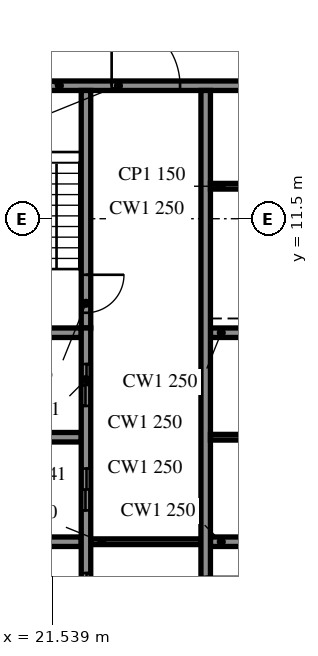
"""IFC4 building model, lengths in metres.
Left out: names, types, materials, properties, quantities, classifications, styles, units other than length and angle.
Written with IfcOpenShell. Run it as: python <this file> out.ifc"""

import sys

from ifc_helpers import new_model, si_unit, direction, frame, frame_2d, origin, place, context, subcontext, project, spatial, rectangle, extrude, element, fill, save


model = new_model("IFC4")
c1 = context("Model", 3, precision=1e-05, world=origin(), true_north=direction((0.0, 1.0)))
c2 = subcontext(c1, "Body", "Model", "MODEL_VIEW")
j1 = project(units=[si_unit("LENGTHUNIT", "METRE"), si_unit("PLANEANGLEUNIT", "RADIAN")], contexts=[c1])
p1 = place(None, origin())
s1 = spatial("IfcSite", under=j1, at=p1, CompositionType="ELEMENT")
p2 = place(p1, origin())
s2 = spatial("IfcBuilding", under=s1, at=p2, CompositionType="ELEMENT")
p3 = place(p2, frame((0.0, 0.0, 174.4)))
s3 = spatial("IfcBuildingStorey", under=s2, at=p3, CompositionType="ELEMENT", Elevation=174.4)
p4 = place(p3, frame((19.45, 15.0, 0.0), z_axis=(0.0, 0.0, 1.0), x_axis=(1.0, 0.0, 0.0)))
e1 = element("IfcWall", 1, at=p4, inside=s3, PredefinedType="SOLIDWALL", context=c2, shape_type="SweptSolid", body=[
    extrude(rectangle(XDim=9.1, YDim=0.25, at=frame_2d((4.55, 0.0))), origin(), (0.0, 0.0, 1.0), 3.46),
])
p5 = place(p4, frame((3.65, 0.0, 0.0)))
e2 = element("IfcOpeningElement", 2, at=p5, cuts=e1, PredefinedType="OPENING", context=c2, shape_type="SweptSolid", body=[
    extrude(rectangle(XDim=1.8, YDim=2.1, at=frame_2d((0.9, 1.05))), frame((0.0, 0.135, 0.0), z_axis=(0.0, -1.0, 0.0), x_axis=(1.0, 0.0, 0.0)), (0.0, 0.0, 1.0), 0.27),
])
p6 = place(p3, frame((22.425, -8.875, 0.0), z_axis=(0.0, 0.0, 1.0), x_axis=(0.0, 1.0, 0.0)))
e3 = element("IfcWall", 3, at=p6, inside=s3, PredefinedType="SOLIDWALL", context=c2, shape_type="SweptSolid", body=[
    extrude(rectangle(XDim=17.5, YDim=0.25, at=frame_2d((8.75, 0.0))), origin(), (0.0, 0.0, 1.0), 3.46),
])
p7 = place(p6, frame((7.2, 0.0, 0.0)))
e4 = element("IfcOpeningElement", 4, at=p7, cuts=e3, PredefinedType="OPENING", context=c2, shape_type="SweptSolid", body=[
    extrude(rectangle(XDim=1.1, YDim=2.1, at=frame_2d((0.55, 1.05))), frame((0.0, 0.135, 0.0), z_axis=(0.0, -1.0, 0.0), x_axis=(1.0, 0.0, 0.0)), (0.0, 0.0, 1.0), 0.27),
])
p8 = place(p6, frame((9.95, 0.0, 0.0)))
e5 = element("IfcOpeningElement", 5, at=p8, cuts=e3, PredefinedType="OPENING", context=c2, shape_type="SweptSolid", body=[
    extrude(rectangle(XDim=1.1, YDim=2.1, at=frame_2d((0.55, 1.05))), frame((0.0, 0.135, 0.0), z_axis=(0.0, -1.0, 0.0), x_axis=(1.0, 0.0, 0.0)), (0.0, 0.0, 1.0), 0.27),
])
p9 = place(p6, frame((12.7, 0.0, 0.0)))
e6 = element("IfcOpeningElement", 6, at=p9, cuts=e3, PredefinedType="OPENING", context=c2, shape_type="SweptSolid", body=[
    extrude(rectangle(XDim=1.1, YDim=2.1, at=frame_2d((0.55, 1.05))), frame((0.0, 0.135, 0.0), z_axis=(0.0, -1.0, 0.0), x_axis=(1.0, 0.0, 0.0)), (0.0, 0.0, 1.0), 0.27),
])
p10 = place(p6, frame((15.45, 0.0, 0.0)))
e7 = element("IfcOpeningElement", 7, at=p10, cuts=e3, PredefinedType="OPENING", context=c2, shape_type="SweptSolid", body=[
    extrude(rectangle(XDim=1.1, YDim=2.1, at=frame_2d((0.55, 1.05))), frame((0.0, 0.135, 0.0), z_axis=(0.0, -1.0, 0.0), x_axis=(1.0, 0.0, 0.0)), (0.0, 0.0, 1.0), 0.27),
])
p11 = place(p6, frame((0.512, 0.0, 0.0)))
e8 = element("IfcOpeningElement", 8, at=p11, cuts=e3, PredefinedType="OPENING", context=c2, shape_type="SweptSolid", body=[
    extrude(rectangle(XDim=0.9, YDim=2.1, at=frame_2d((0.45, 1.05))), frame((0.0, 0.135, 0.0), z_axis=(0.0, -1.0, 0.0), x_axis=(1.0, 0.0, 0.0)), (0.0, 0.0, 1.0), 0.27),
])
p12 = place(p6, frame((3.587, 0.0, 0.0)))
e9 = element("IfcOpeningElement", 9, at=p12, cuts=e3, PredefinedType="OPENING", context=c2, shape_type="SweptSolid", body=[
    extrude(rectangle(XDim=0.9, YDim=2.1, at=frame_2d((0.45, 1.05))), frame((0.0, 0.135, 0.0), z_axis=(0.0, -1.0, 0.0), x_axis=(1.0, 0.0, 0.0)), (0.0, 0.0, 1.0), 0.27),
])
p13 = place(p3, frame((22.425, 14.875, 0.0), z_axis=(0.0, 0.0, 1.0), x_axis=(0.0, -1.0, 0.0)))
e10 = element("IfcWall", 10, at=p13, inside=s3, PredefinedType="SOLIDWALL", context=c2, shape_type="SweptSolid", body=[
    extrude(rectangle(XDim=6.25, YDim=0.25, at=frame_2d((3.125, 0.0))), origin(), (0.0, 0.0, 1.0), 3.46),
])
p14 = place(p13, frame((4.85, 0.0, 0.0)))
e11 = element("IfcOpeningElement", 11, at=p14, cuts=e10, PredefinedType="OPENING", context=c2, shape_type="SweptSolid", body=[
    extrude(rectangle(XDim=1.0, YDim=2.1, at=frame_2d((0.5, 1.05))), frame((0.0, 0.135, 0.0), z_axis=(0.0, -1.0, 0.0), x_axis=(1.0, 0.0, 0.0)), (0.0, 0.0, 1.0), 0.27),
])
p15 = place(p3, frame((25.575, 14.875, 0.0), z_axis=(0.0, 0.0, 1.0), x_axis=(0.0, -1.0, 0.0)))
e12 = element("IfcWall", 12, at=p15, inside=s3, PredefinedType="SOLIDWALL", context=c2, shape_type="SweptSolid", body=[
    extrude(rectangle(XDim=17.5, YDim=0.25, at=frame_2d((8.75, 0.0))), origin(), (0.0, 0.0, 1.0), 3.46),
])
p16 = place(p15, frame((15.45, 0.0, 0.0)))
e13 = element("IfcOpeningElement", 13, at=p16, cuts=e12, PredefinedType="OPENING", context=c2, shape_type="SweptSolid", body=[
    extrude(rectangle(XDim=1.1, YDim=2.1, at=frame_2d((0.55, 1.05))), frame((0.0, 0.135, 0.0), z_axis=(0.0, -1.0, 0.0), x_axis=(1.0, 0.0, 0.0)), (0.0, 0.0, 1.0), 0.27),
])
p17 = place(p15, frame((12.8, 0.0, 0.0)))
e14 = element("IfcOpeningElement", 14, at=p17, cuts=e12, PredefinedType="OPENING", context=c2, shape_type="SweptSolid", body=[
    extrude(rectangle(XDim=0.9, YDim=2.1, at=frame_2d((0.45, 1.05))), frame((0.0, 0.135, 0.0), z_axis=(0.0, -1.0, 0.0), x_axis=(1.0, 0.0, 0.0)), (0.0, 0.0, 1.0), 0.27),
])
for number, where, z_axis, x_axis in (
    (15, (19.45, 3.0, 0.0), (0.0, 0.0, 1.0), (1.0, 0.0, 0.0)),
    (16, (19.45, 5.75, 0.0), (0.0, 0.0, 1.0), (1.0, 0.0, 0.0)),
    (17, (19.45, 8.5, 0.0), (0.0, 0.0, 1.0), (1.0, 0.0, 0.0)),
    (18, (25.7, 3.0, 0.0), (0.0, 0.0, 1.0), (1.0, 0.0, 0.0)),
    (19, (25.7, 8.5, 0.0), (0.0, 0.0, 1.0), (1.0, 0.0, 0.0)),
):
    element("IfcWall", number, at=place(p3, frame(where, z_axis=z_axis, x_axis=x_axis)), inside=s3, PredefinedType="SOLIDWALL", context=c2, shape_type="SweptSolid", body=[
        extrude(rectangle(XDim=2.85, YDim=0.25, at=frame_2d((1.425, 0.0))), origin(), (0.0, 0.0, 1.0), 3.46),
    ])
p18 = place(p3, frame((22.55, 3.0, 0.0), z_axis=(0.0, 0.0, 1.0), x_axis=(1.0, 0.0, 0.0)))
e20 = element("IfcWall", 20, at=p18, inside=s3, PredefinedType="PARTITIONING", context=c2, shape_type="SweptSolid", body=[
    extrude(rectangle(XDim=2.9, YDim=0.15, at=frame_2d((1.45, 0.0))), origin(), (0.0, 0.0, 1.0), 3.46),
])
for number, where, z_axis, x_axis in (
    (21, (25.7, 5.75, 0.0), (0.0, 0.0, 1.0), (1.0, 0.0, 0.0)),
    (22, (25.7, 12.355, 0.0), (0.0, 0.0, 1.0), (1.0, 0.0, 0.0)),
):
    element("IfcWall", number, at=place(p3, frame(where, z_axis=z_axis, x_axis=x_axis)), inside=s3, PredefinedType="PARTITIONING", context=c2, shape_type="SweptSolid", body=[
        extrude(rectangle(XDim=2.85, YDim=0.15, at=frame_2d((1.425, 0.0))), origin(), (0.0, 0.0, 1.0), 3.46),
    ])
p19 = place(p5, origin())
e23 = element("IfcDoor", 23, at=p19, inside=s3, OperationType="DOUBLE_DOOR_SINGLE_SWING", PredefinedType="DOOR", context=c2, shape_type="SweptSolid", body=[
    extrude(rectangle(XDim=1.8, YDim=2.1, at=frame_2d((0.9, 1.05))), frame((0.0, 0.025, 0.0), z_axis=(0.0, -1.0, 0.0), x_axis=(1.0, 0.0, 0.0)), (0.0, 0.0, 1.0), 0.05),
])
fill(e2, e23)
p20 = place(p8, origin())
e24 = element("IfcDoor", 24, at=p20, inside=s3, OperationType="DOUBLE_DOOR_SLIDING", PredefinedType="DOOR", context=c2, shape_type="SweptSolid", body=[
    extrude(rectangle(XDim=1.1, YDim=2.1, at=frame_2d((0.55, 1.05))), frame((0.0, 0.025, 0.0), z_axis=(0.0, -1.0, 0.0), x_axis=(1.0, 0.0, 0.0)), (0.0, 0.0, 1.0), 0.05),
])
fill(e5, e24)
p21 = place(p9, origin())
e25 = element("IfcDoor", 25, at=p21, inside=s3, OperationType="DOUBLE_DOOR_SLIDING", PredefinedType="DOOR", context=c2, shape_type="SweptSolid", body=[
    extrude(rectangle(XDim=1.1, YDim=2.1, at=frame_2d((0.55, 1.05))), frame((0.0, 0.025, 0.0), z_axis=(0.0, -1.0, 0.0), x_axis=(1.0, 0.0, 0.0)), (0.0, 0.0, 1.0), 0.05),
])
fill(e6, e25)
p22 = place(p10, origin())
e26 = element("IfcDoor", 26, at=p22, inside=s3, OperationType="DOUBLE_DOOR_SLIDING", PredefinedType="DOOR", context=c2, shape_type="SweptSolid", body=[
    extrude(rectangle(XDim=1.1, YDim=2.1, at=frame_2d((0.55, 1.05))), frame((0.0, 0.025, 0.0), z_axis=(0.0, -1.0, 0.0), x_axis=(1.0, 0.0, 0.0)), (0.0, 0.0, 1.0), 0.05),
])
fill(e7, e26)
p23 = place(p14, origin())
e27 = element("IfcDoor", 27, at=p23, inside=s3, OperationType="SINGLE_SWING_RIGHT", PredefinedType="DOOR", context=c2, shape_type="SweptSolid", body=[
    extrude(rectangle(XDim=1.0, YDim=2.1, at=frame_2d((0.5, 1.05))), frame((0.0, 0.025, 0.0), z_axis=(0.0, -1.0, 0.0), x_axis=(1.0, 0.0, 0.0)), (0.0, 0.0, 1.0), 0.05),
])
fill(e11, e27)
save(model, sys.argv[1])
